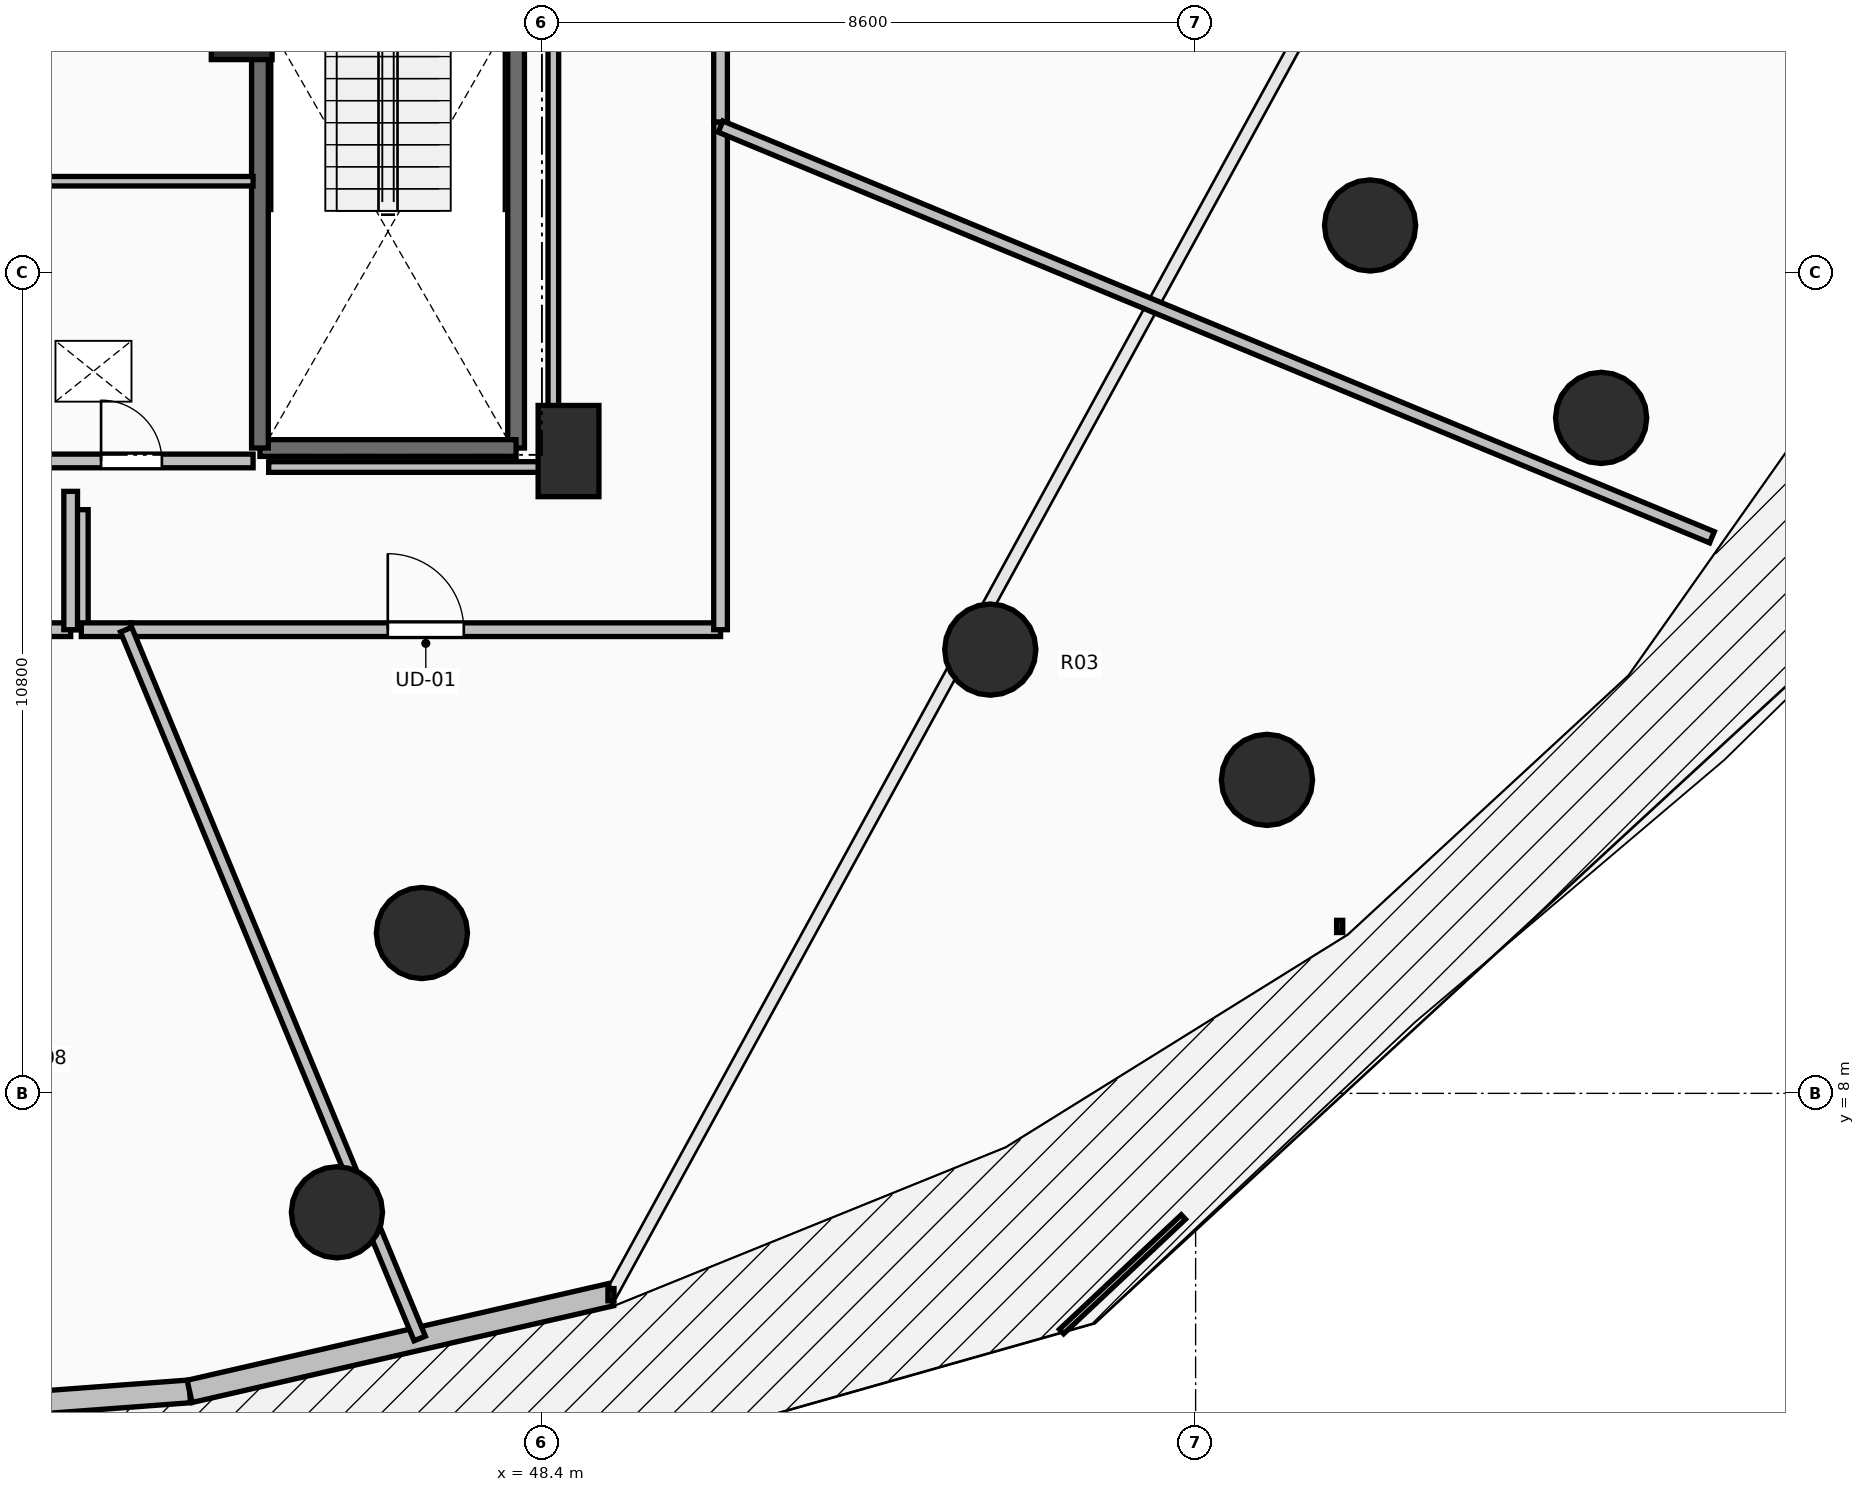
"""IFC4 building model, lengths in metres.
Left out: names, types, materials, properties, quantities, classifications, styles, units other than length and angle.
Written with IfcOpenShell. Run it as: python <this file> out.ifc"""

import sys

from ifc_helpers import new_model, si_unit, direction, frame, frame_2d, origin, origin_2d, place, context, subcontext, project, spatial, rectangle, circle, extrude, element, fill, save


model = new_model("IFC4")
c1 = context("Model", 3, precision=1e-05, world=origin(), true_north=direction((0.0, 1.0)))
c2 = subcontext(c1, "Body", "Model", "MODEL_VIEW")
j1 = project(units=[si_unit("LENGTHUNIT", "METRE"), si_unit("PLANEANGLEUNIT", "RADIAN")], contexts=[c1])
p1 = place(None, origin())
s1 = spatial("IfcSite", under=j1, at=p1, CompositionType="ELEMENT")
p2 = place(p1, origin())
s2 = spatial("IfcBuilding", under=s1, at=p2, CompositionType="ELEMENT")
p3 = place(p2, frame((0.0, 0.0, 52.0)))
s3 = spatial("IfcBuildingStorey", under=s2, at=p3, CompositionType="ELEMENT", Elevation=52.0)
for number, where, z_axis, x_axis in (
    (1, (46.821, 10.109, 0.0), (0.0, 0.0, 1.0), (0.383, -0.924, 0.0)),
    (2, (54.299, 13.838, 0.0), (0.0, 0.0, 1.0), (0.707, -0.707, 0.0)),
    (3, (59.295, 19.418, 0.0), (0.0, 0.0, 1.0), (0.924, -0.383, 0.0)),
    (4, (45.703, 6.435, 0.0), (0.0, 0.0, 1.0), (0.383, -0.924, 0.0)),
    (5, (57.939, 12.124, 0.0), (0.0, 0.0, 1.0), (0.707, -0.707, 0.0)),
    (6, (62.335, 16.886, 0.0), (0.0, 0.0, 1.0), (0.924, -0.383, 0.0)),
):
    element("IfcColumn", number, at=place(p3, frame(where, z_axis=z_axis, x_axis=x_axis)), inside=s3, PredefinedType="COLUMN", context=c2, shape_type="SweptSolid", body=[
        extrude(circle(Radius=0.6, at=origin_2d()), origin(), (0.0, 0.0, 1.0), 3.5),
    ])
for number, where, z_axis, x_axis in (
    (7, (48.75, 16.45, 0.0), (0.0, 0.0, 1.0), (1.0, 0.0, 0.0)),
    (8, (44.45, 22.2, 0.0), (0.0, 0.0, 1.0), (1.0, 0.0, 0.0)),
):
    element("IfcColumn", number, at=place(p3, frame(where, z_axis=z_axis, x_axis=x_axis)), inside=s3, PredefinedType="PILASTER", context=c2, shape_type="SweptSolid", body=[
        extrude(rectangle(XDim=0.8, YDim=1.2, at=origin_2d()), origin(), (0.0, 0.0, 1.0), 3.5),
    ])
p4 = place(p3, frame((38.0, 3.65, 0.0), z_axis=(0.0, 0.0, 1.0), x_axis=(0.99723690101, 0.074287032943, 0.0)))
e9 = element("IfcWall", 9, at=p4, inside=s3, PredefinedType="STANDARD", context=c2, shape_type="SweptSolid", body=[
    extrude(rectangle(XDim=5.781, YDim=0.3, at=frame_2d((2.89, 0.0))), origin(), (0.0, 0.0, 1.0), 3.24),
])
p5 = place(p4, frame((2.09, 0.0, 0.0)))
e10 = element("IfcOpeningElement", 10, at=p5, cuts=e9, PredefinedType="OPENING", context=c2, shape_type="SweptSolid", body=[
    extrude(rectangle(XDim=1.6, YDim=2.3, at=frame_2d((0.8, 1.15))), frame((0.0, 0.165, 0.0), z_axis=(0.0, -1.0, 0.0), x_axis=(1.0, 0.0, 0.0)), (0.0, 0.0, 1.0), 0.33),
])
p6 = place(p3, frame((43.765, 4.079, 0.0), z_axis=(0.0, 0.0, 1.0), x_axis=(0.974671141646, 0.223642942305, 0.0)))
e11 = element("IfcWall", 11, at=p6, inside=s3, PredefinedType="STANDARD", context=c2, shape_type="SweptSolid", body=[
    extrude(rectangle(XDim=5.688, YDim=0.3, at=frame_2d((2.844, 0.0))), origin(), (0.0, 0.0, 1.0), 3.24),
])
p7 = place(p3, frame((48.06, 23.91, 0.0), z_axis=(0.0, 0.0, 1.0), x_axis=(0.0, -1.0, 0.0)))
e12 = element("IfcWall", 12, at=p7, inside=s3, PredefinedType="SOLIDWALL", context=c2, shape_type="SweptSolid", body=[
    extrude(rectangle(XDim=7.42, YDim=0.22, at=frame_2d((3.71, 0.0))), origin(), (0.0, 0.0, 1.0), 3.24),
])
p8 = place(p3, frame((48.06, 16.49, 0.0), z_axis=(0.0, 0.0, 1.0), x_axis=(-1.0, 0.0, 0.0)))
e13 = element("IfcWall", 13, at=p8, inside=s3, PredefinedType="SOLIDWALL", context=c2, shape_type="SweptSolid", body=[
    extrude(rectangle(XDim=3.37, YDim=0.22, at=frame_2d((1.685, 0.0))), origin(), (0.0, 0.0, 1.0), 3.24),
])
p9 = place(p3, frame((44.69, 16.49, 0.0), z_axis=(0.0, 0.0, 1.0), x_axis=(0.0, 1.0, 0.0)))
e14 = element("IfcWall", 14, at=p9, inside=s3, PredefinedType="SOLIDWALL", context=c2, shape_type="SweptSolid", body=[
    extrude(rectangle(XDim=7.42, YDim=0.22, at=frame_2d((3.71, 0.0))), origin(), (0.0, 0.0, 1.0), 3.24),
])
p10 = place(p3, frame((44.6, 20.0, 0.0), z_axis=(0.0, 0.0, 1.0), x_axis=(-1.0, 0.0, 0.0)))
e15 = element("IfcWall", 15, at=p10, inside=s3, PredefinedType="PARTITIONING", context=c2, shape_type="SweptSolid", body=[
    extrude(rectangle(XDim=3.2, YDim=0.125, at=frame_2d((1.6, 0.0))), origin(), (0.0, 0.0, 1.0), 3.24),
])
p11 = place(p3, frame((41.4, 16.32, 0.0), z_axis=(0.0, 0.0, 1.0), x_axis=(1.0, 0.0, 0.0)))
e16 = element("IfcWall", 16, at=p11, inside=s3, PredefinedType="PARTITIONING", context=c2, shape_type="SweptSolid", body=[
    extrude(rectangle(XDim=3.2, YDim=0.18, at=frame_2d((1.6, 0.0))), origin(), (0.0, 0.0, 1.0), 3.24),
])
p12 = place(p11, frame((1.2, 0.0, 0.0)))
e17 = element("IfcOpeningElement", 17, at=p12, cuts=e16, PredefinedType="OPENING", context=c2, shape_type="SweptSolid", body=[
    extrude(rectangle(XDim=0.8, YDim=2.05, at=frame_2d((0.4, 1.025))), frame((0.0, 0.105, 0.0), z_axis=(0.0, -1.0, 0.0), x_axis=(1.0, 0.0, 0.0)), (0.0, 0.0, 1.0), 0.21),
])
p13 = place(p3, frame((42.34, 15.679, 0.0), z_axis=(0.0, 0.0, 1.0), x_axis=(0.0, -1.0, 0.0)))
e18 = element("IfcWall", 18, at=p13, inside=s3, PredefinedType="PARTITIONING", context=c2, shape_type="SweptSolid", body=[
    extrude(rectangle(XDim=1.579, YDim=0.18, at=frame_2d((0.79, 0.0))), origin(), (0.0, 0.0, 1.0), 3.24),
])
p14 = place(p3, frame((42.34, 14.1, 0.0), z_axis=(0.0, 0.0, 1.0), x_axis=(1.0, 0.0, 0.0)))
e19 = element("IfcWall", 19, at=p14, inside=s3, PredefinedType="PARTITIONING", context=c2, shape_type="SweptSolid", body=[
    extrude(rectangle(XDim=0.654, YDim=0.18, at=frame_2d((0.327, 0.0))), origin(), (0.0, 0.0, 1.0), 3.24),
])
p15 = place(p3, frame((38.689, 14.1, 0.0), z_axis=(0.0, 0.0, 1.0), x_axis=(1.0, 0.0, 0.0)))
e20 = element("IfcWall", 20, at=p15, inside=s3, PredefinedType="PARTITIONING", context=c2, shape_type="SweptSolid", body=[
    extrude(rectangle(XDim=3.511, YDim=0.18, at=frame_2d((1.755, 0.0))), origin(), (0.0, 0.0, 1.0), 3.24),
])
p16 = place(p15, frame((1.23, 0.0, 0.0)))
e21 = element("IfcOpeningElement", 21, at=p16, cuts=e20, PredefinedType="OPENING", context=c2, shape_type="SweptSolid", body=[
    extrude(rectangle(XDim=1.05, YDim=2.2, at=frame_2d((0.525, 1.1))), frame((0.0, 0.105, 0.0), z_axis=(0.0, -1.0, 0.0), x_axis=(1.0, 0.0, 0.0)), (0.0, 0.0, 1.0), 0.21),
])
p17 = place(p3, frame((42.2, 14.1, 0.0), z_axis=(0.0, 0.0, 1.0), x_axis=(0.0, 1.0, 0.0)))
e22 = element("IfcWall", 22, at=p17, inside=s3, PredefinedType="PARTITIONING", context=c2, shape_type="SweptSolid", body=[
    extrude(rectangle(XDim=1.82, YDim=0.18, at=frame_2d((0.91, 0.0))), origin(), (0.0, 0.0, 1.0), 3.24),
])
p18 = place(p3, frame((42.994, 14.1, 0.0), z_axis=(0.0, 0.0, 1.0), x_axis=(1.0, 0.0, 0.0)))
e23 = element("IfcWall", 23, at=p18, inside=s3, PredefinedType="PARTITIONING", context=c2, shape_type="SweptSolid", body=[
    extrude(rectangle(XDim=7.756, YDim=0.18, at=frame_2d((3.878, 0.0))), origin(), (0.0, 0.0, 1.0), 2.432),
])
p19 = place(p18, frame((3.378, 0.0, 0.0)))
e24 = element("IfcOpeningElement", 24, at=p19, cuts=e23, PredefinedType="OPENING", context=c2, shape_type="SweptSolid", body=[
    extrude(rectangle(XDim=1.0, YDim=2.15, at=frame_2d((0.5, 1.075))), frame((0.0, 0.105, 0.0), z_axis=(0.0, -1.0, 0.0), x_axis=(1.0, 0.0, 0.0)), (0.0, 0.0, 1.0), 0.21),
])
p20 = place(p3, frame((50.75, 14.1, 0.0), z_axis=(0.0, 0.0, 1.0), x_axis=(0.0, 1.0, 0.0)))
e25 = element("IfcWall", 25, at=p20, inside=s3, PredefinedType="PARTITIONING", context=c2, shape_type="SweptSolid", body=[
    extrude(rectangle(XDim=6.679, YDim=0.18, at=frame_2d((3.339, 0.0))), origin(), (0.0, 0.0, 1.0), 2.432),
])
p21 = place(p3, frame((50.75, 20.779, 0.0), z_axis=(0.0, 0.0, 1.0), x_axis=(0.0, 1.0, 0.0)))
e26 = element("IfcWall", 26, at=p21, inside=s3, PredefinedType="PARTITIONING", context=c2, shape_type="SweptSolid", body=[
    extrude(rectangle(XDim=10.302, YDim=0.18, at=frame_2d((5.151, 0.0))), origin(), (0.0, 0.0, 1.0), 2.432),
])
p22 = place(p21, frame((4.651, 0.0, 0.0)))
e27 = element("IfcOpeningElement", 27, at=p22, cuts=e26, PredefinedType="OPENING", context=c2, shape_type="SweptSolid", body=[
    extrude(rectangle(XDim=1.0, YDim=2.15, at=frame_2d((0.5, 1.075))), frame((0.0, 0.105, 0.0), z_axis=(0.0, -1.0, 0.0), x_axis=(1.0, 0.0, 0.0)), (0.0, 0.0, 1.0), 0.21),
])
p23 = place(p3, frame((46.792, 4.775, 0.0), z_axis=(0.0, 0.0, 1.0), x_axis=(-0.382718503749, 0.923865004689, 0.0)))
e28 = element("IfcWall", 28, at=p23, inside=s3, PredefinedType="PARTITIONING", context=c2, shape_type="SweptSolid", body=[
    extrude(rectangle(XDim=10.094, YDim=0.16, at=frame_2d((5.047, 0.0))), origin(), (0.0, 0.0, 1.0), 2.432),
])
p24 = place(p3, frame((63.793, 15.316, 0.0), z_axis=(0.0, 0.0, 1.0), x_axis=(-0.923866969846, 0.382713759914, 0.0)))
e29 = element("IfcWall", 29, at=p24, inside=s3, PredefinedType="PARTITIONING", context=c2, shape_type="SweptSolid", body=[
    extrude(rectangle(XDim=14.118, YDim=0.16, at=frame_2d((7.059, 0.0))), origin(), (0.0, 0.0, 1.0), 2.624),
])
p25 = place(p3, frame((48.55, 23.754, 0.0), z_axis=(0.0, 0.0, 1.0), x_axis=(0.0, -1.0, 0.0)))
e30 = element("IfcWall", 30, at=p25, inside=s3, PredefinedType="PARTITIONING", context=c2, shape_type="SweptSolid", body=[
    extrude(rectangle(XDim=7.514, YDim=0.14, at=frame_2d((3.757, 0.0))), origin(), (0.0, 0.0, 1.0), 2.432),
])
p26 = place(p3, frame((48.55, 16.24, 0.0), z_axis=(0.0, 0.0, 1.0), x_axis=(-1.0, 0.0, 0.0)))
e31 = element("IfcWall", 31, at=p26, inside=s3, PredefinedType="PARTITIONING", context=c2, shape_type="SweptSolid", body=[
    extrude(rectangle(XDim=3.745, YDim=0.14, at=frame_2d((1.873, 0.0))), origin(), (0.0, 0.0, 1.0), 2.432),
])
p27 = place(p12, origin())
e32 = element("IfcDoor", 32, at=p27, inside=s3, OperationType="SINGLE_SWING_LEFT", PredefinedType="DOOR", context=c2, shape_type="SweptSolid", body=[
    extrude(rectangle(XDim=0.8, YDim=2.05, at=frame_2d((0.4, 1.025))), frame((0.0, 0.025, 0.0), z_axis=(0.0, -1.0, 0.0), x_axis=(1.0, 0.0, 0.0)), (0.0, 0.0, 1.0), 0.05),
])
fill(e17, e32)
p28 = place(p19, origin())
e33 = element("IfcDoor", 33, at=p28, inside=s3, OperationType="SINGLE_SWING_LEFT", PredefinedType="DOOR", context=c2, shape_type="SweptSolid", body=[
    extrude(rectangle(XDim=1.0, YDim=2.15, at=frame_2d((0.5, 1.075))), frame((0.0, 0.025, 0.0), z_axis=(0.0, -1.0, 0.0), x_axis=(1.0, 0.0, 0.0)), (0.0, 0.0, 1.0), 0.05),
])
fill(e24, e33)
save(model, sys.argv[1])
